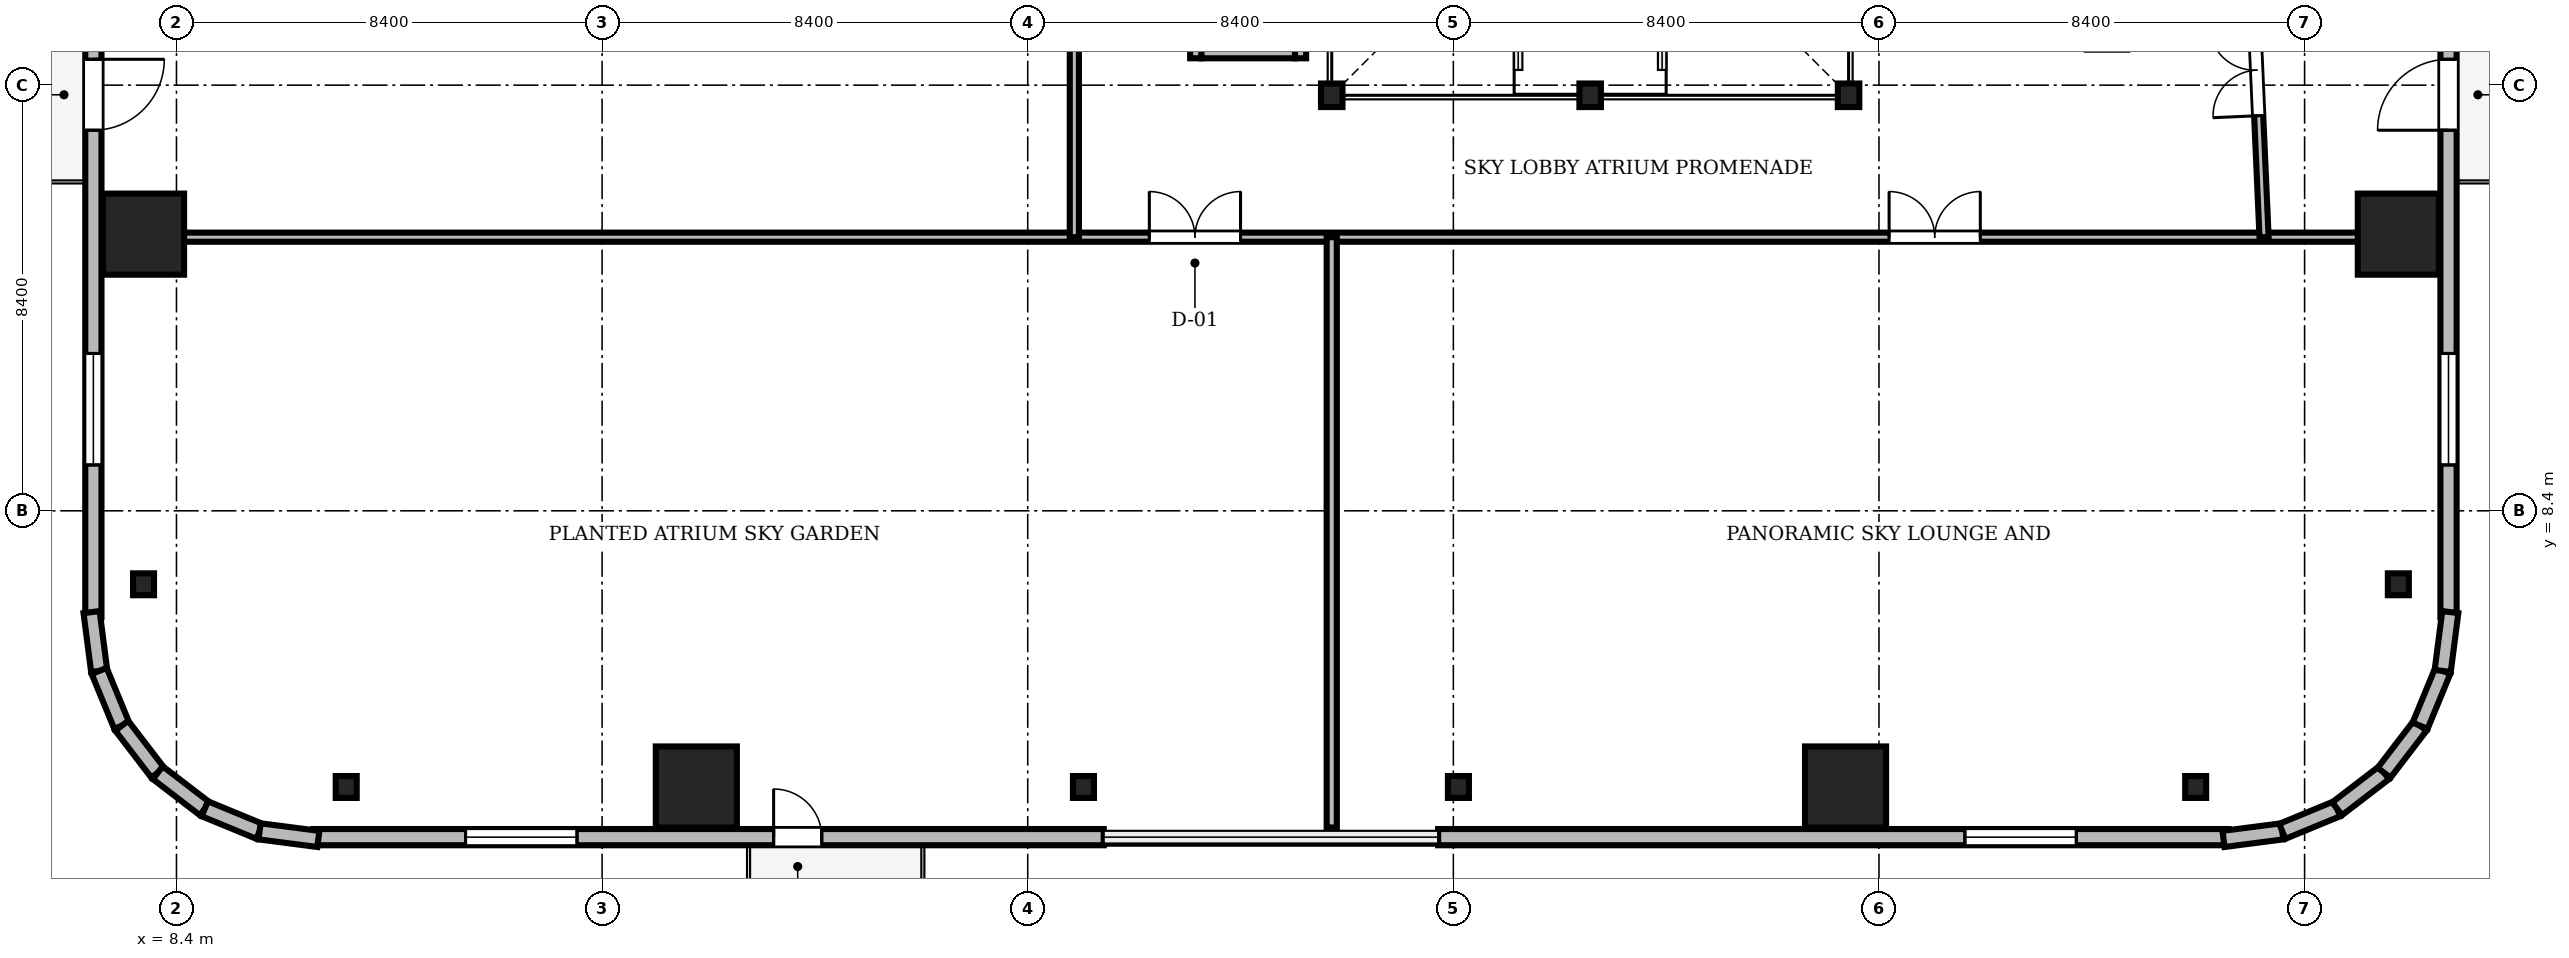
"""IFC4 building model, lengths in metres.
Left out: names, types, materials, properties, quantities, classifications, styles, units other than length and angle.
Written with IfcOpenShell. Run it as: python <this file> out.ifc"""

import sys

from ifc_helpers import new_model, si_unit, direction, frame, frame_2d, origin, origin_2d, place, context, subcontext, project, spatial, rectangle, i_section, extrude, source, transform, mapped, element, fill, save


model = new_model("IFC4")
c1 = context("Model", 3, precision=1e-05, world=origin(), true_north=direction((0.0, 1.0)))
c2 = subcontext(c1, "Body", "Model", "MODEL_VIEW")
j1 = project(units=[si_unit("LENGTHUNIT", "METRE"), si_unit("PLANEANGLEUNIT", "RADIAN")], contexts=[c1])
p1 = place(None, origin())
s1 = spatial("IfcSite", under=j1, at=p1, CompositionType="ELEMENT")
p2 = place(p1, origin())
s2 = spatial("IfcBuilding", under=s1, at=p2, CompositionType="ELEMENT")
p3 = place(p2, frame((0.0, 0.0, 98.7)))
s3 = spatial("IfcBuildingStorey", under=s2, at=p3, CompositionType="ELEMENT", Elevation=98.7)
m1 = source(origin(), c2, "Body", "SweptSolid", [
    extrude(i_section(OverallWidth=0.424, OverallDepth=0.465, WebThickness=0.035, FlangeThickness=0.056, FilletRadius=0.015, at=origin_2d()), origin(), (0.0, 0.0, 1.0), 4.76),
])
for number, where, z_axis, x_axis in (
    (1, (31.2, 16.6, 0.0), (0.0, 0.0, 1.0), (1.0, 0.0, 0.0)),
    (2, (36.3, 16.6, 0.0), (0.0, 0.0, 1.0), (1.0, 0.0, 0.0)),
    (3, (41.4, 16.6, 0.0), (0.0, 0.0, 1.0), (1.0, 0.0, 0.0)),
):
    element("IfcColumn", number, at=place(p3, frame(where, z_axis=z_axis, x_axis=x_axis)), inside=s3, PredefinedType="COLUMN", context=c2, shape_type="MappedRepresentation", body=[
        mapped(m1, transform((0.0, 0.0, 0.0), scale=1.0)),
    ])
m2 = source(origin(), c2, "Body", "SweptSolid", [
    extrude(rectangle(XDim=1.6, YDim=1.6, at=origin_2d()), origin(), (0.0, 0.0, 1.0), 4.76),
])
for number, where, z_axis, x_axis in (
    (4, (18.66, 2.95, 0.0), (0.0, 0.0, 1.0), (1.0, 0.0, 0.0)),
    (5, (41.34, 2.95, 0.0), (0.0, 0.0, 1.0), (1.0, 0.0, 0.0)),
    (6, (52.25, 13.86, 0.0), (0.0, 0.0, 1.0), (1.0, 0.0, 0.0)),
    (7, (7.75, 13.86, 0.0), (0.0, 0.0, 1.0), (1.0, 0.0, 0.0)),
):
    element("IfcColumn", number, at=place(p3, frame(where, z_axis=z_axis, x_axis=x_axis)), inside=s3, PredefinedType="COLUMN", context=c2, shape_type="MappedRepresentation", body=[
        mapped(m2, transform((0.0, 0.0, 0.0), scale=1.0)),
    ])
m3 = source(origin(), c2, "Body", "SweptSolid", [
    extrude(i_section(OverallWidth=0.414, OverallDepth=0.432, WebThickness=0.026, FlangeThickness=0.04, FilletRadius=0.015, at=origin_2d()), origin(), (0.0, 0.0, 1.0), 4.76),
])
for number, where, z_axis, x_axis in (
    (8, (11.75, 2.95, 0.0), (0.0, 0.0, 1.0), (1.0, 0.0, 0.0)),
    (9, (26.3, 2.95, 0.0), (0.0, 0.0, 1.0), (1.0, 0.0, 0.0)),
    (10, (33.7, 2.95, 0.0), (0.0, 0.0, 1.0), (1.0, 0.0, 0.0)),
    (11, (48.25, 2.95, 0.0), (0.0, 0.0, 1.0), (1.0, 0.0, 0.0)),
    (12, (52.25, 6.95, 0.0), (0.0, 0.0, 1.0), (1.0, 0.0, 0.0)),
    (13, (7.75, 6.95, 0.0), (0.0, 0.0, 1.0), (1.0, 0.0, 0.0)),
):
    element("IfcColumn", number, at=place(p3, frame(where, z_axis=z_axis, x_axis=x_axis)), inside=s3, PredefinedType="COLUMN", context=c2, shape_type="MappedRepresentation", body=[
        mapped(m3, transform((0.0, 0.0, 0.0), scale=1.0)),
    ])
m4 = source(origin(), c2, "Body", "SweptSolid", [
    extrude(rectangle(XDim=15.6, YDim=0.32, at=frame_2d((7.8, 0.0))), origin(), (0.0, 0.0, 1.0), 4.76),
])
p4 = place(p3, frame((11.1, 1.96, 0.0), z_axis=(0.0, 0.0, 1.0), x_axis=(1.0, 0.0, 0.0)))
e14 = element("IfcWall", 14, at=p4, inside=s3, PredefinedType="SOLIDWALL", context=c2, shape_type="MappedRepresentation", body=[
    mapped(m4, transform((0.0, 0.0, 0.0), scale=1.0)),
])
m5 = source(origin(), c2, "Body", "SweptSolid", [
    extrude(rectangle(XDim=0.95, YDim=2.3, at=frame_2d((0.475, 1.15))), frame((0.0, 0.17, 0.0), z_axis=(0.0, -1.0, 0.0), x_axis=(1.0, 0.0, 0.0)), (0.0, 0.0, 1.0), 0.34),
])
p5 = place(p4, frame((9.085, 0.0, 0.0)))
e15 = element("IfcOpeningElement", 15, at=p5, cuts=e14, PredefinedType="OPENING", context=c2, shape_type="MappedRepresentation", body=[
    mapped(m5, transform((0.0, 0.0, 0.0), scale=1.0)),
])
m6 = source(origin(), c2, "Body", "SweptSolid", [
    extrude(rectangle(XDim=2.2, YDim=2.4, at=frame_2d((1.1, 1.2))), frame((0.0, 0.17, 0.0), z_axis=(0.0, -1.0, 0.0), x_axis=(1.0, 0.0, 0.0)), (0.0, 0.0, 1.0), 0.34),
])
p6 = place(p4, frame((3.005, 0.0, 0.72)))
e16 = element("IfcOpeningElement", 16, at=p6, cuts=e14, PredefinedType="OPENING", context=c2, shape_type="MappedRepresentation", body=[
    mapped(m6, transform((0.0, 0.0, 0.0), scale=1.0)),
])
p7 = place(p3, frame((33.3, 1.96, 0.0), z_axis=(0.0, 0.0, 1.0), x_axis=(1.0, 0.0, 0.0)))
e17 = element("IfcWall", 17, at=p7, inside=s3, PredefinedType="SOLIDWALL", context=c2, shape_type="MappedRepresentation", body=[
    mapped(m4, transform((0.0, 0.0, 0.0), scale=1.0)),
])
p8 = place(p7, frame((10.395, 0.0, 0.72)))
e18 = element("IfcOpeningElement", 18, at=p8, cuts=e17, PredefinedType="OPENING", context=c2, shape_type="MappedRepresentation", body=[
    mapped(m6, transform((0.0, 0.0, 0.0), scale=1.0)),
])
p9 = place(p3, frame((6.76, 21.9, 0.0), z_axis=(0.0, 0.0, 1.0), x_axis=(0.0, -1.0, 0.0)))
e19 = element("IfcWall", 19, at=p9, inside=s3, PredefinedType="SOLIDWALL", context=c2, shape_type="MappedRepresentation", body=[
    mapped(m4, transform((0.0, 0.0, 0.0), scale=1.0)),
])
m7 = source(origin(), c2, "Body", "SweptSolid", [
    extrude(rectangle(XDim=1.4, YDim=2.3, at=frame_2d((0.7, 1.15))), frame((0.0, 0.17, 0.0), z_axis=(0.0, -1.0, 0.0), x_axis=(1.0, 0.0, 0.0)), (0.0, 0.0, 1.0), 0.34),
])
p10 = place(p9, frame((4.59, 0.0, 0.0)))
e20 = element("IfcOpeningElement", 20, at=p10, cuts=e19, PredefinedType="OPENING", context=c2, shape_type="MappedRepresentation", body=[
    mapped(m7, transform((0.0, 0.0, 0.0), scale=1.0)),
])
p11 = place(p9, frame((10.395, 0.0, 0.72)))
e21 = element("IfcOpeningElement", 21, at=p11, cuts=e19, PredefinedType="OPENING", context=c2, shape_type="MappedRepresentation", body=[
    mapped(m6, transform((0.0, 0.0, 0.0), scale=1.0)),
])
p12 = place(p3, frame((53.24, 6.3, 0.0), z_axis=(0.0, 0.0, 1.0), x_axis=(0.0, 1.0, 0.0)))
e22 = element("IfcWall", 22, at=p12, inside=s3, PredefinedType="SOLIDWALL", context=c2, shape_type="MappedRepresentation", body=[
    mapped(m4, transform((0.0, 0.0, 0.0), scale=1.0)),
])
p13 = place(p12, frame((9.61, 0.0, 0.0)))
e23 = element("IfcOpeningElement", 23, at=p13, cuts=e22, PredefinedType="OPENING", context=c2, shape_type="MappedRepresentation", body=[
    mapped(m7, transform((0.0, 0.0, 0.0), scale=1.0)),
])
p14 = place(p12, frame((3.005, 0.0, 0.72)))
e24 = element("IfcOpeningElement", 24, at=p14, cuts=e22, PredefinedType="OPENING", context=c2, shape_type="MappedRepresentation", body=[
    mapped(m6, transform((0.0, 0.0, 0.0), scale=1.0)),
])
m8 = source(origin(), c2, "Body", "SweptSolid", [
    extrude(rectangle(XDim=1.171, YDim=0.32, at=frame_2d((0.585, 0.0))), origin(), (0.0, 0.0, 1.0), 4.76),
])
p15 = place(p3, frame((6.724, 6.401, 0.0), z_axis=(0.0, 0.0, 1.0), x_axis=(0.128269133229, -0.991739395941, 0.0)))
e25 = element("IfcWall", 25, at=p15, inside=s3, PredefinedType="SOLIDWALL", context=c2, shape_type="MappedRepresentation", body=[
    mapped(m8, transform((0.0, 0.0, 0.0), scale=1.0)),
])
m9 = source(origin(), c2, "Body", "SweptSolid", [
    extrude(rectangle(XDim=1.169, YDim=0.32, at=frame_2d((0.584, 0.0))), origin(), (0.0, 0.0, 1.0), 4.76),
])
for number, where, z_axis, x_axis in (
    (26, (6.875, 5.24, 0.0), (0.0, 0.0, 1.0), (0.381, -0.925, 0.0)),
    (27, (7.32, 4.159, 0.0), (0.0, 0.0, 1.0), (0.608, -0.794, 0.0)),
):
    element("IfcWall", number, at=place(p3, frame(where, z_axis=z_axis, x_axis=x_axis)), inside=s3, PredefinedType="SOLIDWALL", context=c2, shape_type="MappedRepresentation", body=[
        mapped(m9, transform((0.0, 0.0, 0.0), scale=1.0)),
    ])
m10 = source(origin(), c2, "Body", "SweptSolid", [
    extrude(rectangle(XDim=1.169, YDim=0.32, at=frame_2d((0.584, 0.0))), origin(), (0.0, 0.0, 1.0), 4.76),
])
p16 = place(p3, frame((8.031, 3.231, 0.0), z_axis=(0.0, 0.0, 1.0), x_axis=(0.793663520347, -0.608356981114, 0.0)))
e28 = element("IfcWall", 28, at=p16, inside=s3, PredefinedType="SOLIDWALL", context=c2, shape_type="MappedRepresentation", body=[
    mapped(m10, transform((0.0, 0.0, 0.0), scale=1.0)),
])
m11 = source(origin(), c2, "Body", "SweptSolid", [
    extrude(rectangle(XDim=1.169, YDim=0.32, at=frame_2d((0.585, 0.0))), origin(), (0.0, 0.0, 1.0), 4.76),
])
p17 = place(p3, frame((8.959, 2.52, 0.0), z_axis=(0.0, 0.0, 1.0), x_axis=(0.924479075121, -0.381232789334, 0.0)))
e29 = element("IfcWall", 29, at=p17, inside=s3, PredefinedType="SOLIDWALL", context=c2, shape_type="MappedRepresentation", body=[
    mapped(m11, transform((0.0, 0.0, 0.0), scale=1.0)),
])
m12 = source(origin(), c2, "Body", "SweptSolid", [
    extrude(rectangle(XDim=1.17, YDim=0.32, at=frame_2d((0.585, 0.0))), origin(), (0.0, 0.0, 1.0), 4.76),
])
for number, where, z_axis, x_axis in (
    (30, (10.04, 2.074, 0.0), (0.0, 0.0, 1.0), (0.992, -0.128, 0.0)),
    (31, (48.8, 1.925, 0.0), (0.0, 0.0, 1.0), (0.992, 0.128, 0.0)),
):
    element("IfcWall", number, at=place(p3, frame(where, z_axis=z_axis, x_axis=x_axis)), inside=s3, PredefinedType="SOLIDWALL", context=c2, shape_type="MappedRepresentation", body=[
        mapped(m12, transform((0.0, 0.0, 0.0), scale=1.0)),
    ])
p18 = place(p3, frame((49.96, 2.074, 0.0), z_axis=(0.0, 0.0, 1.0), x_axis=(0.924479075121, 0.381232789334, 0.0)))
e32 = element("IfcWall", 32, at=p18, inside=s3, PredefinedType="SOLIDWALL", context=c2, shape_type="MappedRepresentation", body=[
    mapped(m11, transform((0.0, 0.0, 0.0), scale=1.0)),
])
p19 = place(p3, frame((51.041, 2.52, 0.0), z_axis=(0.0, 0.0, 1.0), x_axis=(0.793663520347, 0.608356981114, 0.0)))
e33 = element("IfcWall", 33, at=p19, inside=s3, PredefinedType="SOLIDWALL", context=c2, shape_type="MappedRepresentation", body=[
    mapped(m10, transform((0.0, 0.0, 0.0), scale=1.0)),
])
for number, where, z_axis, x_axis in (
    (34, (51.969, 3.231, 0.0), (0.0, 0.0, 1.0), (0.608, 0.794, 0.0)),
    (35, (52.68, 4.159, 0.0), (0.0, 0.0, 1.0), (0.381, 0.925, 0.0)),
):
    element("IfcWall", number, at=place(p3, frame(where, z_axis=z_axis, x_axis=x_axis)), inside=s3, PredefinedType="SOLIDWALL", context=c2, shape_type="MappedRepresentation", body=[
        mapped(m9, transform((0.0, 0.0, 0.0), scale=1.0)),
    ])
p20 = place(p3, frame((53.125, 5.24, 0.0), z_axis=(0.0, 0.0, 1.0), x_axis=(0.128269133229, 0.991739395941, 0.0)))
e36 = element("IfcWall", 36, at=p20, inside=s3, PredefinedType="SOLIDWALL", context=c2, shape_type="MappedRepresentation", body=[
    mapped(m8, transform((0.0, 0.0, 0.0), scale=1.0)),
])
m13 = source(origin(), c2, "Body", "SweptSolid", [
    extrude(rectangle(XDim=1.85, YDim=0.22, at=frame_2d((0.925, 0.0))), origin(), (0.0, 0.0, 1.0), 4.76),
])
p21 = place(p3, frame((28.625, 17.44, 0.0), z_axis=(0.0, 0.0, 1.0), x_axis=(1.0, 0.0, 0.0)))
e37 = element("IfcWall", 37, at=p21, inside=s3, PredefinedType="SOLIDWALL", context=c2, shape_type="MappedRepresentation", body=[
    mapped(m13, transform((0.0, 0.0, 0.0), scale=1.0)),
])
m14 = source(origin(), c2, "Body", "SweptSolid", [
    extrude(rectangle(XDim=2.54, YDim=0.22, at=frame_2d((1.27, 0.0))), origin(), (0.0, 0.0, 1.0), 4.76),
])
for number, where, z_axis, x_axis in (
    (38, (28.515, 17.33, 0.0), (0.0, 0.0, 1.0), (0.0, 1.0, 0.0)),
    (39, (30.585, 17.33, 0.0), (0.0, 0.0, 1.0), (0.0, 1.0, 0.0)),
):
    element("IfcWall", number, at=place(p3, frame(where, z_axis=z_axis, x_axis=x_axis)), inside=s3, PredefinedType="SOLIDWALL", context=c2, shape_type="MappedRepresentation", body=[
        mapped(m14, transform((0.0, 0.0, 0.0), scale=1.0)),
    ])
m15 = source(origin(), c2, "Body", "SweptSolid", [
    extrude(rectangle(XDim=46.1, YDim=0.18, at=frame_2d((23.05, 0.0))), origin(), (0.0, 0.0, 1.0), 4.002),
])
p22 = place(p3, frame((6.95, 13.8, 0.0), z_axis=(0.0, 0.0, 1.0), x_axis=(1.0, 0.0, 0.0)))
e40 = element("IfcWall", 40, at=p22, inside=s3, PredefinedType="PARTITIONING", context=c2, shape_type="MappedRepresentation", body=[
    mapped(m15, transform((0.0, 0.0, 0.0), scale=1.0)),
])
m16 = source(origin(), c2, "Body", "SweptSolid", [
    extrude(rectangle(XDim=1.8, YDim=2.4, at=frame_2d((0.9, 1.2))), frame((0.0, 0.1, 0.0), z_axis=(0.0, -1.0, 0.0), x_axis=(1.0, 0.0, 0.0)), (0.0, 0.0, 1.0), 0.2),
])
p23 = place(p22, frame((20.65, 0.0, 0.0)))
e41 = element("IfcOpeningElement", 41, at=p23, cuts=e40, PredefinedType="OPENING", context=c2, shape_type="MappedRepresentation", body=[
    mapped(m16, transform((0.0, 0.0, 0.0), scale=1.0)),
])
p24 = place(p22, frame((35.25, 0.0, 0.0)))
e42 = element("IfcOpeningElement", 42, at=p24, cuts=e40, PredefinedType="OPENING", context=c2, shape_type="MappedRepresentation", body=[
    mapped(m16, transform((0.0, 0.0, 0.0), scale=1.0)),
])
m17 = source(origin(), c2, "Body", "SweptSolid", [
    extrude(rectangle(XDim=27.106, YDim=0.18, at=frame_2d((13.553, 0.0))), origin(), (0.0, 0.0, 1.0), 4.152),
])
p25 = place(p3, frame((49.6, 13.8, 0.0), z_axis=(0.0, 0.0, 1.0), x_axis=(-0.044277164483, 0.999019285452, 0.0)))
e43 = element("IfcWall", 43, at=p25, inside=s3, PredefinedType="PARTITIONING", context=c2, shape_type="MappedRepresentation", body=[
    mapped(m17, transform((0.0, 0.0, 0.0), scale=1.0)),
])
p26 = place(p25, frame((2.4, 0.0, 0.0)))
e44 = element("IfcOpeningElement", 44, at=p26, cuts=e43, PredefinedType="OPENING", context=c2, shape_type="MappedRepresentation", body=[
    mapped(m16, transform((0.0, 0.0, 0.0), scale=1.0)),
])
m18 = source(origin(), c2, "Body", "SweptSolid", [
    extrude(rectangle(XDim=1.05, YDim=2.2, at=frame_2d((0.525, 1.1))), frame((0.0, 0.1, 0.0), z_axis=(0.0, -1.0, 0.0), x_axis=(1.0, 0.0, 0.0)), (0.0, 0.0, 1.0), 0.2),
])
p27 = place(p25, frame((19.2, 0.0, 0.0)))
e45 = element("IfcOpeningElement", 45, at=p27, cuts=e43, PredefinedType="OPENING", context=c2, shape_type="MappedRepresentation", body=[
    mapped(m18, transform((0.0, 0.0, 0.0), scale=1.0)),
])
m19 = source(origin(), c2, "Body", "SweptSolid", [
    extrude(rectangle(XDim=14.45, YDim=0.18, at=frame_2d((7.225, 0.0))), origin(), (0.0, 0.0, 1.0), 4.152),
])
p28 = place(p3, frame((26.12, 13.8, 0.0), z_axis=(0.0, 0.0, 1.0), x_axis=(0.0, 1.0, 0.0)))
e46 = element("IfcWall", 46, at=p28, inside=s3, PredefinedType="PARTITIONING", context=c2, shape_type="MappedRepresentation", body=[
    mapped(m19, transform((0.0, 0.0, 0.0), scale=1.0)),
])
p29 = place(p28, frame((4.2, 0.0, 0.0)))
e47 = element("IfcOpeningElement", 47, at=p29, cuts=e46, PredefinedType="OPENING", context=c2, shape_type="MappedRepresentation", body=[
    mapped(m18, transform((0.0, 0.0, 0.0), scale=1.0)),
])
m20 = source(origin(), c2, "Body", "SweptSolid", [
    extrude(rectangle(XDim=11.65, YDim=0.2, at=frame_2d((5.825, 0.0))), origin(), (0.0, 0.0, 1.0), 4.002),
])
p30 = place(p3, frame((31.2, 2.15, 0.0), z_axis=(0.0, 0.0, 1.0), x_axis=(0.0, 1.0, 0.0)))
e48 = element("IfcWall", 48, at=p30, inside=s3, PredefinedType="PARTITIONING", context=c2, shape_type="MappedRepresentation", body=[
    mapped(m20, transform((0.0, 0.0, 0.0), scale=1.0)),
])
m21 = source(origin(), c2, "Body", "SweptSolid", [
    extrude(rectangle(XDim=0.95, YDim=2.3, at=frame_2d((0.475, 1.15))), frame((0.0, 0.025, 0.0), z_axis=(0.0, -1.0, 0.0), x_axis=(1.0, 0.0, 0.0)), (0.0, 0.0, 1.0), 0.05),
])
p31 = place(p5, frame((0.95, 0.0, 0.0), z_axis=(0.0, 0.0, 1.0), x_axis=(-1.0, 0.0, 0.0)))
e49 = element("IfcDoor", 49, at=p31, inside=s3, OperationType="NOTDEFINED", PredefinedType="DOOR", context=c2, shape_type="MappedRepresentation", body=[
    mapped(m21, transform((0.0, 0.0, 0.0), scale=1.0)),
])
fill(e15, e49)
m22 = source(origin(), c2, "Body", "SweptSolid", [
    extrude(rectangle(XDim=2.2, YDim=2.4, at=frame_2d((1.1, 1.2))), frame((0.0, 0.03, 0.0), z_axis=(0.0, -1.0, 0.0), x_axis=(1.0, 0.0, 0.0)), (0.0, 0.0, 1.0), 0.06),
])
p32 = place(p6, origin())
e50 = element("IfcWindow", 50, at=p32, inside=s3, PartitioningType="SINGLE_PANEL", PredefinedType="WINDOW", context=c2, shape_type="MappedRepresentation", body=[
    mapped(m22, transform((0.0, 0.0, 0.0), scale=1.0)),
])
fill(e16, e50)
p33 = place(p8, origin())
e51 = element("IfcWindow", 51, at=p33, inside=s3, PartitioningType="SINGLE_PANEL", PredefinedType="WINDOW", context=c2, shape_type="MappedRepresentation", body=[
    mapped(m22, transform((0.0, 0.0, 0.0), scale=1.0)),
])
fill(e18, e51)
m23 = source(origin(), c2, "Body", "SweptSolid", [
    extrude(rectangle(XDim=1.4, YDim=2.3, at=frame_2d((0.7, 1.15))), frame((0.0, 0.025, 0.0), z_axis=(0.0, -1.0, 0.0), x_axis=(1.0, 0.0, 0.0)), (0.0, 0.0, 1.0), 0.05),
])
p34 = place(p10, frame((1.4, 0.0, 0.0), z_axis=(0.0, 0.0, 1.0), x_axis=(-1.0, 0.0, 0.0)))
e52 = element("IfcDoor", 52, at=p34, inside=s3, OperationType="DOUBLE_DOOR_SLIDING", PredefinedType="DOOR", context=c2, shape_type="MappedRepresentation", body=[
    mapped(m23, transform((0.0, 0.0, 0.0), scale=1.0)),
])
fill(e20, e52)
p35 = place(p11, origin())
e53 = element("IfcWindow", 53, at=p35, inside=s3, PartitioningType="SINGLE_PANEL", PredefinedType="WINDOW", context=c2, shape_type="MappedRepresentation", body=[
    mapped(m22, transform((0.0, 0.0, 0.0), scale=1.0)),
])
fill(e21, e53)
p36 = place(p13, frame((1.4, 0.0, 0.0), z_axis=(0.0, 0.0, 1.0), x_axis=(-1.0, 0.0, 0.0)))
e54 = element("IfcDoor", 54, at=p36, inside=s3, OperationType="DOUBLE_DOOR_SLIDING", PredefinedType="DOOR", context=c2, shape_type="MappedRepresentation", body=[
    mapped(m23, transform((0.0, 0.0, 0.0), scale=1.0)),
])
fill(e23, e54)
p37 = place(p14, origin())
e55 = element("IfcWindow", 55, at=p37, inside=s3, PartitioningType="SINGLE_PANEL", PredefinedType="WINDOW", context=c2, shape_type="MappedRepresentation", body=[
    mapped(m22, transform((0.0, 0.0, 0.0), scale=1.0)),
])
fill(e24, e55)
m24 = source(origin(), c2, "Body", "SweptSolid", [
    extrude(rectangle(XDim=1.8, YDim=2.4, at=frame_2d((0.9, 1.2))), frame((0.0, 0.025, 0.0), z_axis=(0.0, -1.0, 0.0), x_axis=(1.0, 0.0, 0.0)), (0.0, 0.0, 1.0), 0.05),
])
p38 = place(p23, origin())
e56 = element("IfcDoor", 56, at=p38, inside=s3, OperationType="DOUBLE_DOOR_SINGLE_SWING", PredefinedType="DOOR", context=c2, shape_type="MappedRepresentation", body=[
    mapped(m24, transform((0.0, 0.0, 0.0), scale=1.0)),
])
fill(e41, e56)
p39 = place(p24, origin())
e57 = element("IfcDoor", 57, at=p39, inside=s3, OperationType="DOUBLE_DOOR_SINGLE_SWING", PredefinedType="DOOR", context=c2, shape_type="MappedRepresentation", body=[
    mapped(m24, transform((0.0, 0.0, 0.0), scale=1.0)),
])
fill(e42, e57)
p40 = place(p26, origin())
e58 = element("IfcDoor", 58, at=p40, inside=s3, OperationType="DOUBLE_DOOR_SINGLE_SWING", PredefinedType="DOOR", context=c2, shape_type="MappedRepresentation", body=[
    mapped(m24, transform((0.0, 0.0, 0.0), scale=1.0)),
])
fill(e44, e58)
save(model, sys.argv[1])
